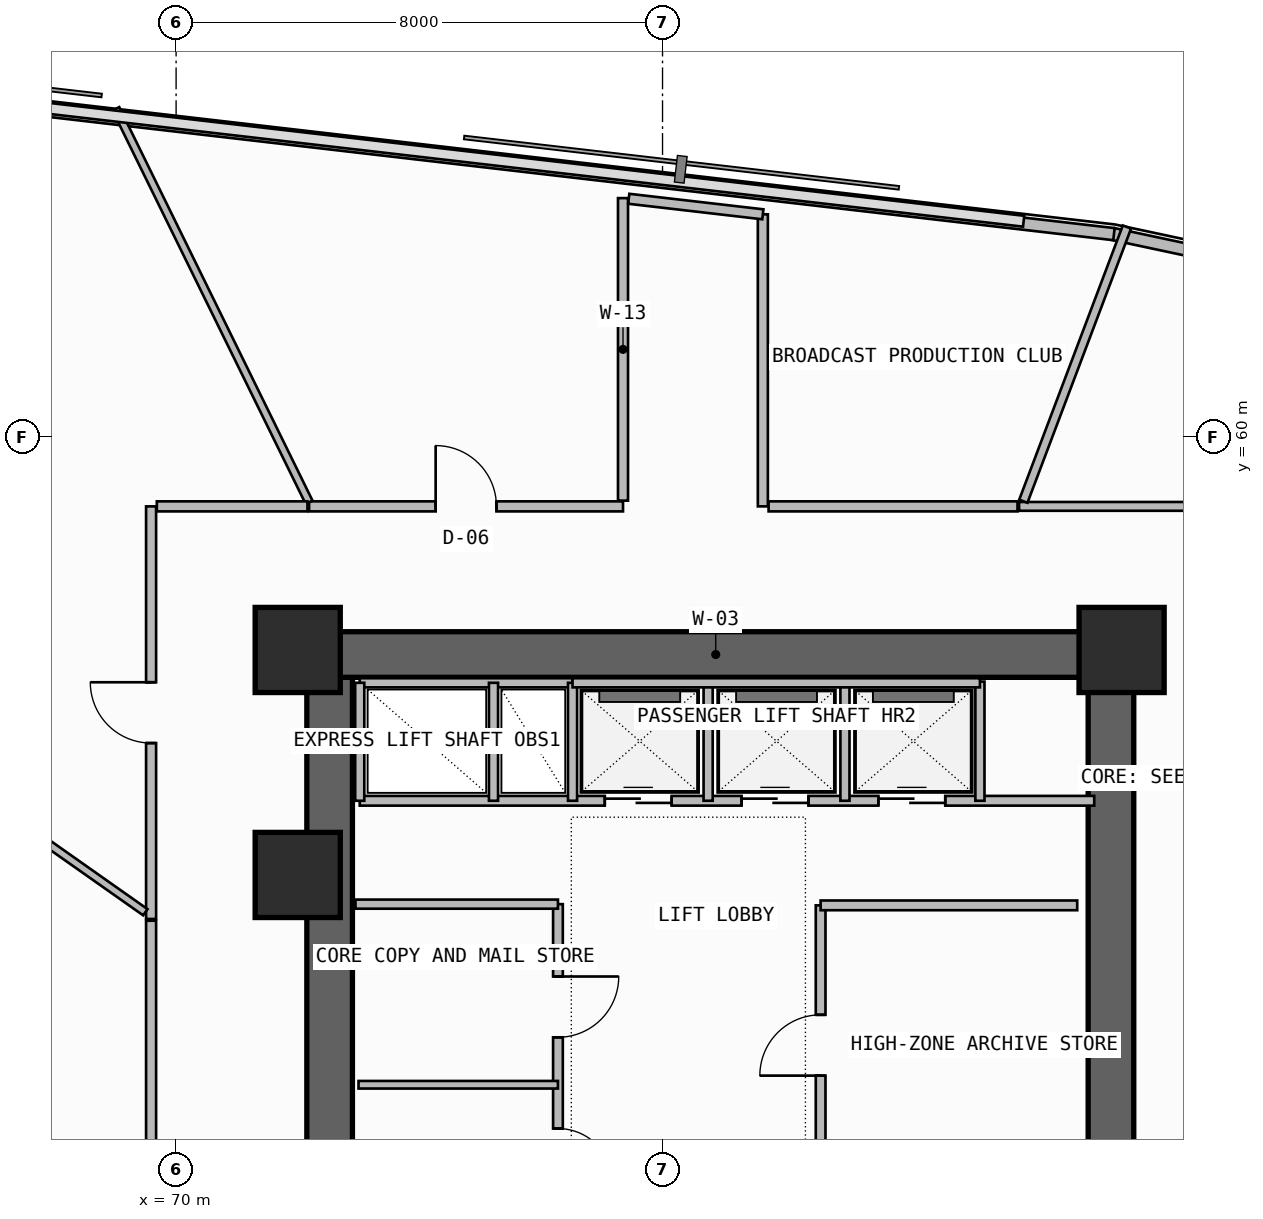
"""IFC4 building model, lengths in metres.
Left out: names, types, materials, properties, quantities, classifications, styles, units other than length and angle.
Written with IfcOpenShell. Run it as: python <this file> out.ifc"""

import sys

from ifc_helpers import new_model, si_unit, direction, frame, frame_2d, origin, origin_2d, place, context, subcontext, project, spatial, rectangle, extrude, element, fill, save


model = new_model("IFC4")
c1 = context("Model", 3, precision=1e-05, world=origin(), true_north=direction((0.0, 1.0)))
c2 = subcontext(c1, "Body", "Model", "MODEL_VIEW")
j1 = project(units=[si_unit("LENGTHUNIT", "METRE"), si_unit("PLANEANGLEUNIT", "RADIAN")], contexts=[c1])
p1 = place(None, origin())
s1 = spatial("IfcSite", under=j1, at=p1, CompositionType="ELEMENT")
p2 = place(p1, origin())
s2 = spatial("IfcBuilding", under=s1, at=p2, CompositionType="ELEMENT")
p3 = place(p2, frame((0.0, 0.0, 214.98)))
s3 = spatial("IfcBuildingStorey", under=s2, at=p3, CompositionType="ELEMENT", Elevation=214.98)
p4 = place(p3, frame((72.525, 43.35, -0.26), z_axis=(0.0, 0.0, 1.0), x_axis=(0.0, 1.0, 0.0)))
e1 = element("IfcWall", 1, at=p4, inside=s3, PredefinedType="SHEAR", context=c2, shape_type="SweptSolid", body=[
    extrude(rectangle(XDim=12.7, YDim=0.75, at=frame_2d((6.35, 0.0))), origin(), (0.0, 0.0, 1.0), 3.52),
])
p5 = place(p4, frame((1.35, 0.0, 0.26)))
e2 = element("IfcOpeningElement", 2, at=p5, cuts=e1, PredefinedType="OPENING", context=c2, shape_type="SweptSolid", body=[
    extrude(rectangle(XDim=1.2, YDim=2.2, at=frame_2d((0.6, 1.1))), frame((0.0, 0.385, 0.0), z_axis=(0.0, -1.0, 0.0), x_axis=(1.0, 0.0, 0.0)), (0.0, 0.0, 1.0), 0.77),
])
p6 = place(p3, frame((72.0, 56.425, -0.26), z_axis=(0.0, 0.0, 1.0), x_axis=(1.0, 0.0, 0.0)))
e3 = element("IfcWall", 3, at=p6, inside=s3, PredefinedType="SHEAR", context=c2, shape_type="SweptSolid", body=[
    extrude(rectangle(XDim=13.75, YDim=0.75, at=frame_2d((6.875, 0.0))), origin(), (0.0, 0.0, 1.0), 3.52),
])
p7 = place(p3, frame((85.375, 47.6, -0.26), z_axis=(0.0, 0.0, 1.0), x_axis=(0.0, 1.0, 0.0)))
e4 = element("IfcWall", 4, at=p7, inside=s3, PredefinedType="SHEAR", context=c2, shape_type="SweptSolid", body=[
    extrude(rectangle(XDim=8.45, YDim=0.75, at=frame_2d((4.225, 0.0))), origin(), (0.0, 0.0, 1.0), 3.52),
])
for number, where, z_axis, x_axis in (
    (5, (72.0, 52.8, 0.0), (0.0, 0.0, 1.0), (1.0, 0.0, 0.0)),
    (6, (72.0, 56.5, 0.0), (0.0, 0.0, 1.0), (1.0, 0.0, 0.0)),
    (7, (85.55, 56.5, 0.0), (0.0, 0.0, 1.0), (1.0, 0.0, 0.0)),
):
    element("IfcColumn", number, at=place(p3, frame(where, z_axis=z_axis, x_axis=x_axis)), inside=s3, PredefinedType="COLUMN", context=c2, shape_type="SweptSolid", body=[
        extrude(rectangle(XDim=1.4, YDim=1.4, at=origin_2d()), origin(), (0.0, 0.0, 1.0), 3.52),
    ])
p8 = place(p3, frame((116.396, 56.722, 0.0), z_axis=(0.0, 0.0, 1.0), x_axis=(-0.977936620644, 0.208901809478, 0.0)))
e8 = element("IfcWall", 8, at=p8, inside=s3, PredefinedType="PARAPET", context=c2, shape_type="SweptSolid", body=[
    extrude(rectangle(XDim=31.685, YDim=0.2, at=frame_2d((15.843, 0.0))), origin(), (0.0, 0.0, 1.0), 1.15),
])
p9 = place(p3, frame((85.424, 63.338, 0.0), z_axis=(0.0, 0.0, 1.0), x_axis=(-0.993364714048, 0.115006716693, 0.0)))
e9 = element("IfcWall", 9, at=p9, inside=s3, PredefinedType="PARAPET", context=c2, shape_type="SweptSolid", body=[
    extrude(rectangle(XDim=26.302, YDim=0.2, at=frame_2d((13.151, 0.0))), origin(), (0.0, 0.0, 1.0), 1.15),
])
p10 = place(p3, frame((76.28, 47.18, 0.0), z_axis=(0.0, 0.0, 1.0), x_axis=(0.0, 1.0, 0.0)))
e10 = element("IfcWall", 10, at=p10, inside=s3, PredefinedType="SOLIDWALL", context=c2, shape_type="SweptSolid", body=[
    extrude(rectangle(XDim=5.14, YDim=0.16, at=frame_2d((2.57, 0.0))), origin(), (0.0, 0.0, 1.0), 3.26),
])
p11 = place(p10, frame((0.55, 0.0, 0.0)))
e11 = element("IfcOpeningElement", 11, at=p11, cuts=e10, PredefinedType="OPENING", context=c2, shape_type="SweptSolid", body=[
    extrude(rectangle(XDim=0.9, YDim=2.1, at=frame_2d((0.45, 1.05))), frame((0.0, 0.09, 0.0), z_axis=(0.0, -1.0, 0.0), x_axis=(1.0, 0.0, 0.0)), (0.0, 0.0, 1.0), 0.18),
])
p12 = place(p10, frame((2.95, 0.0, 0.0)))
e12 = element("IfcOpeningElement", 12, at=p12, cuts=e10, PredefinedType="OPENING", context=c2, shape_type="SweptSolid", body=[
    extrude(rectangle(XDim=1.0, YDim=2.2, at=frame_2d((0.5, 1.1))), frame((0.0, 0.09, 0.0), z_axis=(0.0, -1.0, 0.0), x_axis=(1.0, 0.0, 0.0)), (0.0, 0.0, 1.0), 0.18),
])
p13 = place(p3, frame((72.95, 52.32, 0.0), z_axis=(0.0, 0.0, 1.0), x_axis=(1.0, 0.0, 0.0)))
e13 = element("IfcWall", 13, at=p13, inside=s3, PredefinedType="SOLIDWALL", context=c2, shape_type="SweptSolid", body=[
    extrude(rectangle(XDim=3.33, YDim=0.15, at=frame_2d((1.665, 0.0))), origin(), (0.0, 0.0, 1.0), 3.26),
])
p14 = place(p3, frame((73.0, 49.35, 0.0), z_axis=(0.0, 0.0, 1.0), x_axis=(1.0, 0.0, 0.0)))
e14 = element("IfcWall", 14, at=p14, inside=s3, PredefinedType="PARTITIONING", context=c2, shape_type="SweptSolid", body=[
    extrude(rectangle(XDim=3.28, YDim=0.125, at=frame_2d((1.64, 0.0))), origin(), (0.0, 0.0, 1.0), 3.26),
])
p15 = place(p3, frame((80.6, 47.7, 0.0), z_axis=(0.0, 0.0, 1.0), x_axis=(0.0, 1.0, 0.0)))
e15 = element("IfcWall", 15, at=p15, inside=s3, PredefinedType="SOLIDWALL", context=c2, shape_type="SweptSolid", body=[
    extrude(rectangle(XDim=4.6, YDim=0.16, at=frame_2d((2.3, 0.0))), origin(), (0.0, 0.0, 1.0), 3.26),
])
p16 = place(p15, frame((1.8, 0.0, 0.0)))
e16 = element("IfcOpeningElement", 16, at=p16, cuts=e15, PredefinedType="OPENING", context=c2, shape_type="SweptSolid", body=[
    extrude(rectangle(XDim=1.0, YDim=2.2, at=frame_2d((0.5, 1.1))), frame((0.0, 0.09, 0.0), z_axis=(0.0, -1.0, 0.0), x_axis=(1.0, 0.0, 0.0)), (0.0, 0.0, 1.0), 0.18),
])
p17 = place(p3, frame((80.6, 52.3, 0.0), z_axis=(0.0, 0.0, 1.0), x_axis=(1.0, 0.0, 0.0)))
e17 = element("IfcWall", 17, at=p17, inside=s3, PredefinedType="SOLIDWALL", context=c2, shape_type="SweptSolid", body=[
    extrude(rectangle(XDim=4.22, YDim=0.16, at=frame_2d((2.11, 0.0))), origin(), (0.0, 0.0, 1.0), 3.26),
])
p18 = place(p3, frame((73.02, 54.02, 0.0), z_axis=(0.0, 0.0, 1.0), x_axis=(1.0, 0.0, 0.0)))
e18 = element("IfcWall", 18, at=p18, inside=s3, PredefinedType="SOLIDWALL", context=c2, shape_type="SweptSolid", body=[
    extrude(rectangle(XDim=12.08, YDim=0.16, at=frame_2d((6.04, 0.0))), origin(), (0.0, 0.0, 1.0), 3.26),
])
p19 = place(p18, frame((4.03, 0.0, 0.0)))
e19 = element("IfcOpeningElement", 19, at=p19, cuts=e18, PredefinedType="OPENING", context=c2, shape_type="SweptSolid", body=[
    extrude(rectangle(XDim=1.1, YDim=2.25, at=frame_2d((0.55, 1.125))), frame((0.0, 0.09, 0.0), z_axis=(0.0, -1.0, 0.0), x_axis=(1.0, 0.0, 0.0)), (0.0, 0.0, 1.0), 0.18),
])
p20 = place(p18, frame((6.28, 0.0, 0.0)))
e20 = element("IfcOpeningElement", 20, at=p20, cuts=e18, PredefinedType="OPENING", context=c2, shape_type="SweptSolid", body=[
    extrude(rectangle(XDim=1.1, YDim=2.25, at=frame_2d((0.55, 1.125))), frame((0.0, 0.09, 0.0), z_axis=(0.0, -1.0, 0.0), x_axis=(1.0, 0.0, 0.0)), (0.0, 0.0, 1.0), 0.18),
])
p21 = place(p18, frame((8.53, 0.0, 0.0)))
e21 = element("IfcOpeningElement", 21, at=p21, cuts=e18, PredefinedType="OPENING", context=c2, shape_type="SweptSolid", body=[
    extrude(rectangle(XDim=1.1, YDim=2.25, at=frame_2d((0.55, 1.125))), frame((0.0, 0.09, 0.0), z_axis=(0.0, -1.0, 0.0), x_axis=(1.0, 0.0, 0.0)), (0.0, 0.0, 1.0), 0.18),
])
p22 = place(p3, frame((73.02, 55.96, 0.0), z_axis=(0.0, 0.0, 1.0), x_axis=(1.0, 0.0, 0.0)))
e22 = element("IfcWall", 22, at=p22, inside=s3, PredefinedType="SOLIDWALL", context=c2, shape_type="SweptSolid", body=[
    extrude(rectangle(XDim=3.5, YDim=0.15, at=frame_2d((1.75, 0.0))), origin(), (0.0, 0.0, 1.0), 3.26),
])
p23 = place(p3, frame((73.02, 54.02, 0.0), z_axis=(0.0, 0.0, 1.0), x_axis=(0.0, 1.0, 0.0)))
e23 = element("IfcWall", 23, at=p23, inside=s3, PredefinedType="PLUMBINGWALL", context=c2, shape_type="SweptSolid", body=[
    extrude(rectangle(XDim=1.94, YDim=0.15, at=frame_2d((0.97, 0.0))), origin(), (0.0, 0.0, 1.0), 3.26),
])
p24 = place(p3, frame((76.52, 54.02, 0.0), z_axis=(0.0, 0.0, 1.0), x_axis=(0.0, 1.0, 0.0)))
e24 = element("IfcWall", 24, at=p24, inside=s3, PredefinedType="SOLIDWALL", context=c2, shape_type="SweptSolid", body=[
    extrude(rectangle(XDim=1.94, YDim=0.15, at=frame_2d((0.97, 0.0))), origin(), (0.0, 0.0, 1.0), 3.26),
])
p25 = place(p3, frame((75.22, 54.02, 0.0), z_axis=(0.0, 0.0, 1.0), x_axis=(0.0, 1.0, 0.0)))
e25 = element("IfcWall", 25, at=p25, inside=s3, PredefinedType="PLUMBINGWALL", context=c2, shape_type="SweptSolid", body=[
    extrude(rectangle(XDim=1.94, YDim=0.15, at=frame_2d((0.97, 0.0))), origin(), (0.0, 0.0, 1.0), 3.26),
])
for number, where, z_axis, x_axis in (
    (26, (78.75, 54.02, 0.0), (0.0, 0.0, 1.0), (0.0, 1.0, 0.0)),
    (27, (81.0, 54.02, 0.0), (0.0, 0.0, 1.0), (0.0, 1.0, 0.0)),
):
    element("IfcWall", number, at=place(p3, frame(where, z_axis=z_axis, x_axis=x_axis)), inside=s3, PredefinedType="PLUMBINGWALL", context=c2, shape_type="SweptSolid", body=[
        extrude(rectangle(XDim=1.96, YDim=0.15, at=frame_2d((0.98, 0.0))), origin(), (0.0, 0.0, 1.0), 3.26),
    ])
p26 = place(p3, frame((83.22, 54.02, 0.0), z_axis=(0.0, 0.0, 1.0), x_axis=(0.0, 1.0, 0.0)))
e28 = element("IfcWall", 28, at=p26, inside=s3, PredefinedType="SOLIDWALL", context=c2, shape_type="SweptSolid", body=[
    extrude(rectangle(XDim=1.96, YDim=0.15, at=frame_2d((0.98, 0.0))), origin(), (0.0, 0.0, 1.0), 3.26),
])
p27 = place(p3, frame((76.52, 55.96, 0.0), z_axis=(0.0, 0.0, 1.0), x_axis=(1.0, 0.0, 0.0)))
e29 = element("IfcWall", 29, at=p27, inside=s3, PredefinedType="SOLIDWALL", context=c2, shape_type="SweptSolid", body=[
    extrude(rectangle(XDim=6.7, YDim=0.15, at=frame_2d((3.35, 0.0))), origin(), (0.0, 0.0, 1.0), 3.26),
])
p28 = place(p3, frame((87.877, 58.861, 0.0), z_axis=(0.0, 0.0, 1.0), x_axis=(-1.0, 0.0, 0.0)))
e30 = element("IfcWall", 30, at=p28, inside=s3, PredefinedType="PARTITIONING", context=c2, shape_type="SweptSolid", body=[
    extrude(rectangle(XDim=4.013, YDim=0.145, at=frame_2d((2.007, 0.0))), origin(), (0.0, 0.0, 1.0), 2.745),
])
p29 = place(p3, frame((83.934, 58.946, 0.0), z_axis=(0.0, 0.0, 1.0), x_axis=(0.353431098222, 0.93546055973, 0.0)))
e31 = element("IfcWall", 31, at=p29, inside=s3, PredefinedType="PARTITIONING", context=c2, shape_type="SweptSolid", body=[
    extrude(rectangle(XDim=4.821, YDim=0.145, at=frame_2d((2.41, 0.0))), origin(), (0.0, 0.0, 1.0), 3.26),
])
p30 = place(p3, frame((77.35, 58.861, 0.0), z_axis=(0.0, 0.0, 1.0), x_axis=(-1.0, 0.0, 0.0)))
e32 = element("IfcWall", 32, at=p30, inside=s3, PredefinedType="PARTITIONING", context=c2, shape_type="SweptSolid", body=[
    extrude(rectangle(XDim=5.163, YDim=0.165, at=frame_2d((2.582, 0.0))), origin(), (0.0, 0.0, 1.0), 3.26),
])
p31 = place(p30, frame((2.081, 0.0, 0.0)))
e33 = element("IfcOpeningElement", 33, at=p31, cuts=e32, PredefinedType="OPENING", context=c2, shape_type="SweptSolid", body=[
    extrude(rectangle(XDim=1.0, YDim=2.2, at=frame_2d((0.5, 1.1))), frame((0.0, 0.093, 0.0), z_axis=(0.0, -1.0, 0.0), x_axis=(1.0, 0.0, 0.0)), (0.0, 0.0, 1.0), 0.185),
])
p32 = place(p3, frame((77.35, 63.931, 0.0), z_axis=(0.0, 0.0, 1.0), x_axis=(0.0, -1.0, 0.0)))
e34 = element("IfcWall", 34, at=p32, inside=s3, PredefinedType="PARTITIONING", context=c2, shape_type="SweptSolid", body=[
    extrude(rectangle(XDim=4.975, YDim=0.165, at=frame_2d((2.488, 0.0))), origin(), (0.0, 0.0, 1.0), 3.26),
])
p33 = place(p3, frame((79.65, 58.861, 0.0), z_axis=(0.0, 0.0, 1.0), x_axis=(0.0, 1.0, 0.0)))
e35 = element("IfcWall", 35, at=p33, inside=s3, PredefinedType="PARTITIONING", context=c2, shape_type="SweptSolid", body=[
    extrude(rectangle(XDim=4.803, YDim=0.165, at=frame_2d((2.402, 0.0))), origin(), (0.0, 0.0, 1.0), 3.26),
])
p34 = place(p3, frame((83.838, 58.861, 0.0), z_axis=(0.0, 0.0, 1.0), x_axis=(-1.0, 0.0, 0.0)))
e36 = element("IfcWall", 36, at=p34, inside=s3, PredefinedType="PARTITIONING", context=c2, shape_type="SweptSolid", body=[
    extrude(rectangle(XDim=4.094, YDim=0.165, at=frame_2d((2.047, 0.0))), origin(), (0.0, 0.0, 1.0), 3.26),
])
p35 = place(p3, frame((79.65, 63.665, 0.0), z_axis=(0.0, 0.0, 1.0), x_axis=(-0.993362136032, 0.115028981987, 0.0)))
e37 = element("IfcWall", 37, at=p35, inside=s3, PredefinedType="PARTITIONING", context=c2, shape_type="SweptSolid", body=[
    extrude(rectangle(XDim=2.22, YDim=0.165, at=frame_2d((1.11, 0.0))), origin(), (0.0, 0.0, 1.0), 3.26),
])
p36 = place(p3, frame((72.187, 58.929, 0.0), z_axis=(0.0, 0.0, 1.0), x_axis=(-0.440808632893, 0.897601108047, 0.0)))
e38 = element("IfcWall", 38, at=p36, inside=s3, PredefinedType="PARTITIONING", context=c2, shape_type="SweptSolid", body=[
    extrude(rectangle(XDim=7.209, YDim=0.125, at=frame_2d((3.605, 0.0))), origin(), (0.0, 0.0, 1.0), 3.26),
])
p37 = place(p3, frame((69.589, 58.861, 0.0), z_axis=(0.0, 0.0, 1.0), x_axis=(0.0, -1.0, 0.0)))
e39 = element("IfcWall", 39, at=p37, inside=s3, PredefinedType="PARTITIONING", context=c2, shape_type="SweptSolid", body=[
    extrude(rectangle(XDim=6.785, YDim=0.165, at=frame_2d((3.393, 0.0))), origin(), (0.0, 0.0, 1.0), 2.745),
])
p38 = place(p37, frame((2.893, 0.0, 0.0)))
e40 = element("IfcOpeningElement", 40, at=p38, cuts=e39, PredefinedType="OPENING", context=c2, shape_type="SweptSolid", body=[
    extrude(rectangle(XDim=1.0, YDim=2.2, at=frame_2d((0.5, 1.1))), frame((0.0, 0.093, 0.0), z_axis=(0.0, -1.0, 0.0), x_axis=(1.0, 0.0, 0.0)), (0.0, 0.0, 1.0), 0.185),
])
p39 = place(p3, frame((72.16, 58.861, 0.0), z_axis=(0.0, 0.0, 1.0), x_axis=(-1.0, 0.0, 0.0)))
e41 = element("IfcWall", 41, at=p39, inside=s3, PredefinedType="PARTITIONING", context=c2, shape_type="SweptSolid", body=[
    extrude(rectangle(XDim=2.477, YDim=0.165, at=frame_2d((1.239, 0.0))), origin(), (0.0, 0.0, 1.0), 3.26),
])
p40 = place(p3, frame((69.494, 52.187, 0.0), z_axis=(0.0, 0.0, 1.0), x_axis=(-0.817704178427, 0.575638668422, 0.0)))
e42 = element("IfcWall", 42, at=p40, inside=s3, PredefinedType="PARTITIONING", context=c2, shape_type="SweptSolid", body=[
    extrude(rectangle(XDim=20.565, YDim=0.125, at=frame_2d((10.282, 0.0))), origin(), (0.0, 0.0, 1.0), 2.645),
])
p41 = place(p3, frame((69.589, 52.047, 0.0), z_axis=(0.0, 0.0, 1.0), x_axis=(0.0, -1.0, 0.0)))
e43 = element("IfcWall", 43, at=p41, inside=s3, PredefinedType="PARTITIONING", context=c2, shape_type="SweptSolid", body=[
    extrude(rectangle(XDim=8.452, YDim=0.165, at=frame_2d((4.226, 0.0))), origin(), (0.0, 0.0, 1.0), 2.745),
])
p42 = place(p41, frame((3.726, 0.0, 0.0)))
e44 = element("IfcOpeningElement", 44, at=p42, cuts=e43, PredefinedType="OPENING", context=c2, shape_type="SweptSolid", body=[
    extrude(rectangle(XDim=1.0, YDim=2.2, at=frame_2d((0.5, 1.1))), frame((0.0, 0.093, 0.0), z_axis=(0.0, -1.0, 0.0), x_axis=(1.0, 0.0, 0.0)), (0.0, 0.0, 1.0), 0.185),
])
p43 = place(p11, frame((0.9, 0.0, 0.0), z_axis=(0.0, 0.0, 1.0), x_axis=(-1.0, 0.0, 0.0)))
e45 = element("IfcDoor", 45, at=p43, inside=s3, OperationType="SINGLE_SWING_RIGHT", PredefinedType="DOOR", context=c2, shape_type="SweptSolid", body=[
    extrude(rectangle(XDim=0.9, YDim=2.1, at=frame_2d((0.45, 1.05))), frame((0.0, 0.025, 0.0), z_axis=(0.0, -1.0, 0.0), x_axis=(1.0, 0.0, 0.0)), (0.0, 0.0, 1.0), 0.05),
])
fill(e11, e45)
p44 = place(p12, frame((1.0, 0.0, 0.0), z_axis=(0.0, 0.0, 1.0), x_axis=(-1.0, 0.0, 0.0)))
e46 = element("IfcDoor", 46, at=p44, inside=s3, OperationType="SINGLE_SWING_LEFT", PredefinedType="DOOR", context=c2, shape_type="SweptSolid", body=[
    extrude(rectangle(XDim=1.0, YDim=2.2, at=frame_2d((0.5, 1.1))), frame((0.0, 0.025, 0.0), z_axis=(0.0, -1.0, 0.0), x_axis=(1.0, 0.0, 0.0)), (0.0, 0.0, 1.0), 0.05),
])
fill(e12, e46)
p45 = place(p16, origin())
e47 = element("IfcDoor", 47, at=p45, inside=s3, OperationType="SINGLE_SWING_LEFT", PredefinedType="DOOR", context=c2, shape_type="SweptSolid", body=[
    extrude(rectangle(XDim=1.0, YDim=2.2, at=frame_2d((0.5, 1.1))), frame((0.0, 0.025, 0.0), z_axis=(0.0, -1.0, 0.0), x_axis=(1.0, 0.0, 0.0)), (0.0, 0.0, 1.0), 0.05),
])
fill(e16, e47)
p46 = place(p19, origin())
e48 = element("IfcDoor", 48, at=p46, inside=s3, OperationType="DOUBLE_DOOR_SLIDING", PredefinedType="DOOR", context=c2, shape_type="SweptSolid", body=[
    extrude(rectangle(XDim=1.1, YDim=2.25, at=frame_2d((0.55, 1.125))), frame((0.0, 0.025, 0.0), z_axis=(0.0, -1.0, 0.0), x_axis=(1.0, 0.0, 0.0)), (0.0, 0.0, 1.0), 0.05),
])
fill(e19, e48)
p47 = place(p20, origin())
e49 = element("IfcDoor", 49, at=p47, inside=s3, OperationType="DOUBLE_DOOR_SLIDING", PredefinedType="DOOR", context=c2, shape_type="SweptSolid", body=[
    extrude(rectangle(XDim=1.1, YDim=2.25, at=frame_2d((0.55, 1.125))), frame((0.0, 0.025, 0.0), z_axis=(0.0, -1.0, 0.0), x_axis=(1.0, 0.0, 0.0)), (0.0, 0.0, 1.0), 0.05),
])
fill(e20, e49)
p48 = place(p21, origin())
e50 = element("IfcDoor", 50, at=p48, inside=s3, OperationType="DOUBLE_DOOR_SLIDING", PredefinedType="DOOR", context=c2, shape_type="SweptSolid", body=[
    extrude(rectangle(XDim=1.1, YDim=2.25, at=frame_2d((0.55, 1.125))), frame((0.0, 0.025, 0.0), z_axis=(0.0, -1.0, 0.0), x_axis=(1.0, 0.0, 0.0)), (0.0, 0.0, 1.0), 0.05),
])
fill(e21, e50)
p49 = place(p31, frame((1.0, 0.0, 0.0), z_axis=(0.0, 0.0, 1.0), x_axis=(-1.0, 0.0, 0.0)))
e51 = element("IfcDoor", 51, at=p49, inside=s3, OperationType="SINGLE_SWING_LEFT", PredefinedType="DOOR", context=c2, shape_type="SweptSolid", body=[
    extrude(rectangle(XDim=1.0, YDim=2.2, at=frame_2d((0.5, 1.1))), frame((0.0, 0.025, 0.0), z_axis=(0.0, -1.0, 0.0), x_axis=(1.0, 0.0, 0.0)), (0.0, 0.0, 1.0), 0.05),
])
fill(e33, e51)
p50 = place(p38, frame((1.0, 0.0, 0.0), z_axis=(0.0, 0.0, 1.0), x_axis=(-1.0, 0.0, 0.0)))
e52 = element("IfcDoor", 52, at=p50, inside=s3, OperationType="SINGLE_SWING_RIGHT", PredefinedType="DOOR", context=c2, shape_type="SweptSolid", body=[
    extrude(rectangle(XDim=1.0, YDim=2.2, at=frame_2d((0.5, 1.1))), frame((0.0, 0.025, 0.0), z_axis=(0.0, -1.0, 0.0), x_axis=(1.0, 0.0, 0.0)), (0.0, 0.0, 1.0), 0.05),
])
fill(e40, e52)
save(model, sys.argv[1])
